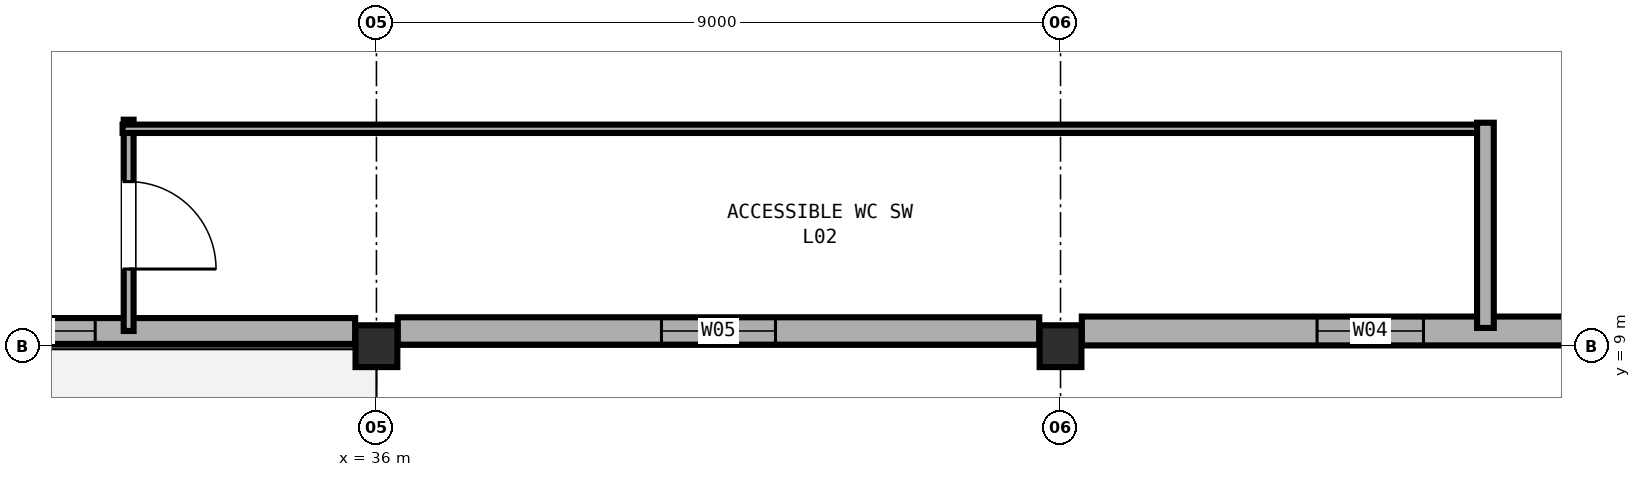
"""IFC4 building model, lengths in metres.
Left out: names, types, materials, properties, quantities, classifications, styles, units other than length and angle.
Written with IfcOpenShell. Run it as: python <this file> out.ifc"""

import sys

from ifc_helpers import new_model, si_unit, direction, frame, frame_2d, origin, origin_2d, place, context, subcontext, project, spatial, rectangle, extrude, element, fill, save


model = new_model("IFC4")
c1 = context("Model", 3, precision=1e-05, world=origin(), true_north=direction((0.0, 1.0)))
c2 = subcontext(c1, "Body", "Model", "MODEL_VIEW")
j1 = project(units=[si_unit("LENGTHUNIT", "METRE"), si_unit("PLANEANGLEUNIT", "RADIAN")], contexts=[c1])
p1 = place(None, origin())
s1 = spatial("IfcSite", under=j1, at=p1, CompositionType="ELEMENT")
p2 = place(p1, origin())
s2 = spatial("IfcBuilding", under=s1, at=p2, CompositionType="ELEMENT")
p3 = place(p2, frame((0.0, 0.0, 9.6)))
s3 = spatial("IfcBuildingStorey", under=s2, at=p3, CompositionType="ELEMENT", Elevation=9.6)
for number, where, z_axis, x_axis in (
    (1, (36.0, 9.0, 0.0), (0.0, 0.0, 1.0), (1.0, 0.0, 0.0)),
    (2, (45.0, 9.0, 0.0), (0.0, 0.0, 1.0), (1.0, 0.0, 0.0)),
):
    element("IfcColumn", number, at=place(p3, frame(where, z_axis=z_axis, x_axis=x_axis)), inside=s3, PredefinedType="COLUMN", context=c2, shape_type="SweptSolid", body=[
        extrude(rectangle(XDim=0.55, YDim=0.55, at=origin_2d()), origin(), (0.0, 0.0, 1.0), 4.8),
    ])
p4 = place(p3, frame((52.87, 9.2, 0.0), z_axis=(0.0, 0.0, 1.0), x_axis=(-1.0, 0.0, 0.0)))
e3 = element("IfcWall", 3, at=p4, inside=s3, PredefinedType="SOLIDWALL", context=c2, shape_type="SweptSolid", body=[
    extrude(rectangle(XDim=7.59, YDim=0.38, at=frame_2d((3.795, 0.0))), origin(), (0.0, 0.0, 1.0), 3.58),
])
p5 = place(p4, frame((3.095, 0.0, 0.9)))
e4 = element("IfcOpeningElement", 4, at=p5, cuts=e3, PredefinedType="OPENING", context=c2, shape_type="SweptSolid", body=[
    extrude(rectangle(XDim=1.4, YDim=1.55, at=frame_2d((0.7, 0.775))), frame((0.0, 0.2, 0.0), z_axis=(0.0, -1.0, 0.0), x_axis=(1.0, 0.0, 0.0)), (0.0, 0.0, 1.0), 0.4),
])
p6 = place(p3, frame((44.72, 9.2, 0.0), z_axis=(0.0, 0.0, 1.0), x_axis=(-1.0, 0.0, 0.0)))
e5 = element("IfcWall", 5, at=p6, inside=s3, PredefinedType="SOLIDWALL", context=c2, shape_type="SweptSolid", body=[
    extrude(rectangle(XDim=8.44, YDim=0.36, at=frame_2d((4.22, 0.0))), origin(), (0.0, 0.0, 1.0), 3.58),
])
p7 = place(p6, frame((3.47, 0.0, 0.9)))
e6 = element("IfcOpeningElement", 6, at=p7, cuts=e5, PredefinedType="OPENING", context=c2, shape_type="SweptSolid", body=[
    extrude(rectangle(XDim=1.5, YDim=1.6, at=frame_2d((0.75, 0.8))), frame((0.0, 0.19, 0.0), z_axis=(0.0, -1.0, 0.0), x_axis=(1.0, 0.0, 0.0)), (0.0, 0.0, 1.0), 0.38),
])
p8 = place(p3, frame((35.72, 9.2, 0.0), z_axis=(0.0, 0.0, 1.0), x_axis=(-1.0, 0.0, 0.0)))
e7 = element("IfcWall", 7, at=p8, inside=s3, PredefinedType="SOLIDWALL", context=c2, shape_type="SweptSolid", body=[
    extrude(rectangle(XDim=8.44, YDim=0.34, at=frame_2d((4.22, 0.0))), origin(), (0.0, 0.0, 1.0), 3.58),
])
p9 = place(p8, frame((3.42, 0.0, 0.9)))
e8 = element("IfcOpeningElement", 8, at=p9, cuts=e7, PredefinedType="OPENING", context=c2, shape_type="SweptSolid", body=[
    extrude(rectangle(XDim=1.6, YDim=1.65, at=frame_2d((0.8, 0.825))), frame((0.0, 0.18, 0.0), z_axis=(0.0, -1.0, 0.0), x_axis=(1.0, 0.0, 0.0)), (0.0, 0.0, 1.0), 0.36),
])
p10 = place(p3, frame((32.74, 11.98, 0.0), z_axis=(0.0, 0.0, 1.0), x_axis=(0.0, -1.0, 0.0)))
e9 = element("IfcWall", 9, at=p10, inside=s3, PredefinedType="PARTITIONING", context=c2, shape_type="SweptSolid", body=[
    extrude(rectangle(XDim=2.78, YDim=0.13, at=frame_2d((1.39, 0.0))), origin(), (0.0, 0.0, 1.0), 3.56),
])
p11 = place(p10, frame((0.815, 0.0, 0.0)))
e10 = element("IfcOpeningElement", 10, at=p11, cuts=e9, PredefinedType="OPENING", context=c2, shape_type="SweptSolid", body=[
    extrude(rectangle(XDim=1.15, YDim=2.15, at=frame_2d((0.575, 1.075))), frame((0.0, 0.075, 0.0), z_axis=(0.0, -1.0, 0.0), x_axis=(1.0, 0.0, 0.0)), (0.0, 0.0, 1.0), 0.15),
])
p12 = place(p3, frame((32.66, 11.86, 0.0), z_axis=(0.0, 0.0, 1.0), x_axis=(1.0, 0.0, 0.0)))
e11 = element("IfcWall", 11, at=p12, inside=s3, PredefinedType="PARTITIONING", context=c2, shape_type="SweptSolid", body=[
    extrude(rectangle(XDim=18.01, YDim=0.11, at=frame_2d((9.005, 0.0))), origin(), (0.0, 0.0, 1.0), 3.56),
])
p13 = place(p3, frame((50.59, 11.94, 0.0), z_axis=(0.0, 0.0, 1.0), x_axis=(0.0, -1.0, 0.0)))
e12 = element("IfcWall", 12, at=p13, inside=s3, PredefinedType="PARTITIONING", context=c2, shape_type="SweptSolid", body=[
    extrude(rectangle(XDim=2.7, YDim=0.22, at=frame_2d((1.35, 0.0))), origin(), (0.0, 0.0, 1.0), 3.56),
])
p14 = place(p5, origin())
e13 = element("IfcWindow", 13, at=p14, inside=s3, PartitioningType="SINGLE_PANEL", PredefinedType="WINDOW", context=c2, shape_type="SweptSolid", body=[
    extrude(rectangle(XDim=1.4, YDim=1.55, at=frame_2d((0.7, 0.775))), frame((0.0, 0.03, 0.0), z_axis=(0.0, -1.0, 0.0), x_axis=(1.0, 0.0, 0.0)), (0.0, 0.0, 1.0), 0.06),
])
fill(e4, e13)
p15 = place(p7, origin())
e14 = element("IfcWindow", 14, at=p15, inside=s3, PartitioningType="SINGLE_PANEL", PredefinedType="WINDOW", context=c2, shape_type="SweptSolid", body=[
    extrude(rectangle(XDim=1.5, YDim=1.6, at=frame_2d((0.75, 0.8))), frame((0.0, 0.03, 0.0), z_axis=(0.0, -1.0, 0.0), x_axis=(1.0, 0.0, 0.0)), (0.0, 0.0, 1.0), 0.06),
])
fill(e6, e14)
p16 = place(p9, origin())
e15 = element("IfcWindow", 15, at=p16, inside=s3, PartitioningType="SINGLE_PANEL", PredefinedType="WINDOW", context=c2, shape_type="SweptSolid", body=[
    extrude(rectangle(XDim=1.6, YDim=1.65, at=frame_2d((0.8, 0.825))), frame((0.0, 0.03, 0.0), z_axis=(0.0, -1.0, 0.0), x_axis=(1.0, 0.0, 0.0)), (0.0, 0.0, 1.0), 0.06),
])
fill(e8, e15)
p17 = place(p11, origin())
e16 = element("IfcDoor", 16, at=p17, inside=s3, OperationType="SINGLE_SWING_RIGHT", PredefinedType="DOOR", context=c2, shape_type="SweptSolid", body=[
    extrude(rectangle(XDim=1.15, YDim=2.15, at=frame_2d((0.575, 1.075))), frame((0.0, 0.025, 0.0), z_axis=(0.0, -1.0, 0.0), x_axis=(1.0, 0.0, 0.0)), (0.0, 0.0, 1.0), 0.05),
])
fill(e10, e16)
save(model, sys.argv[1])
